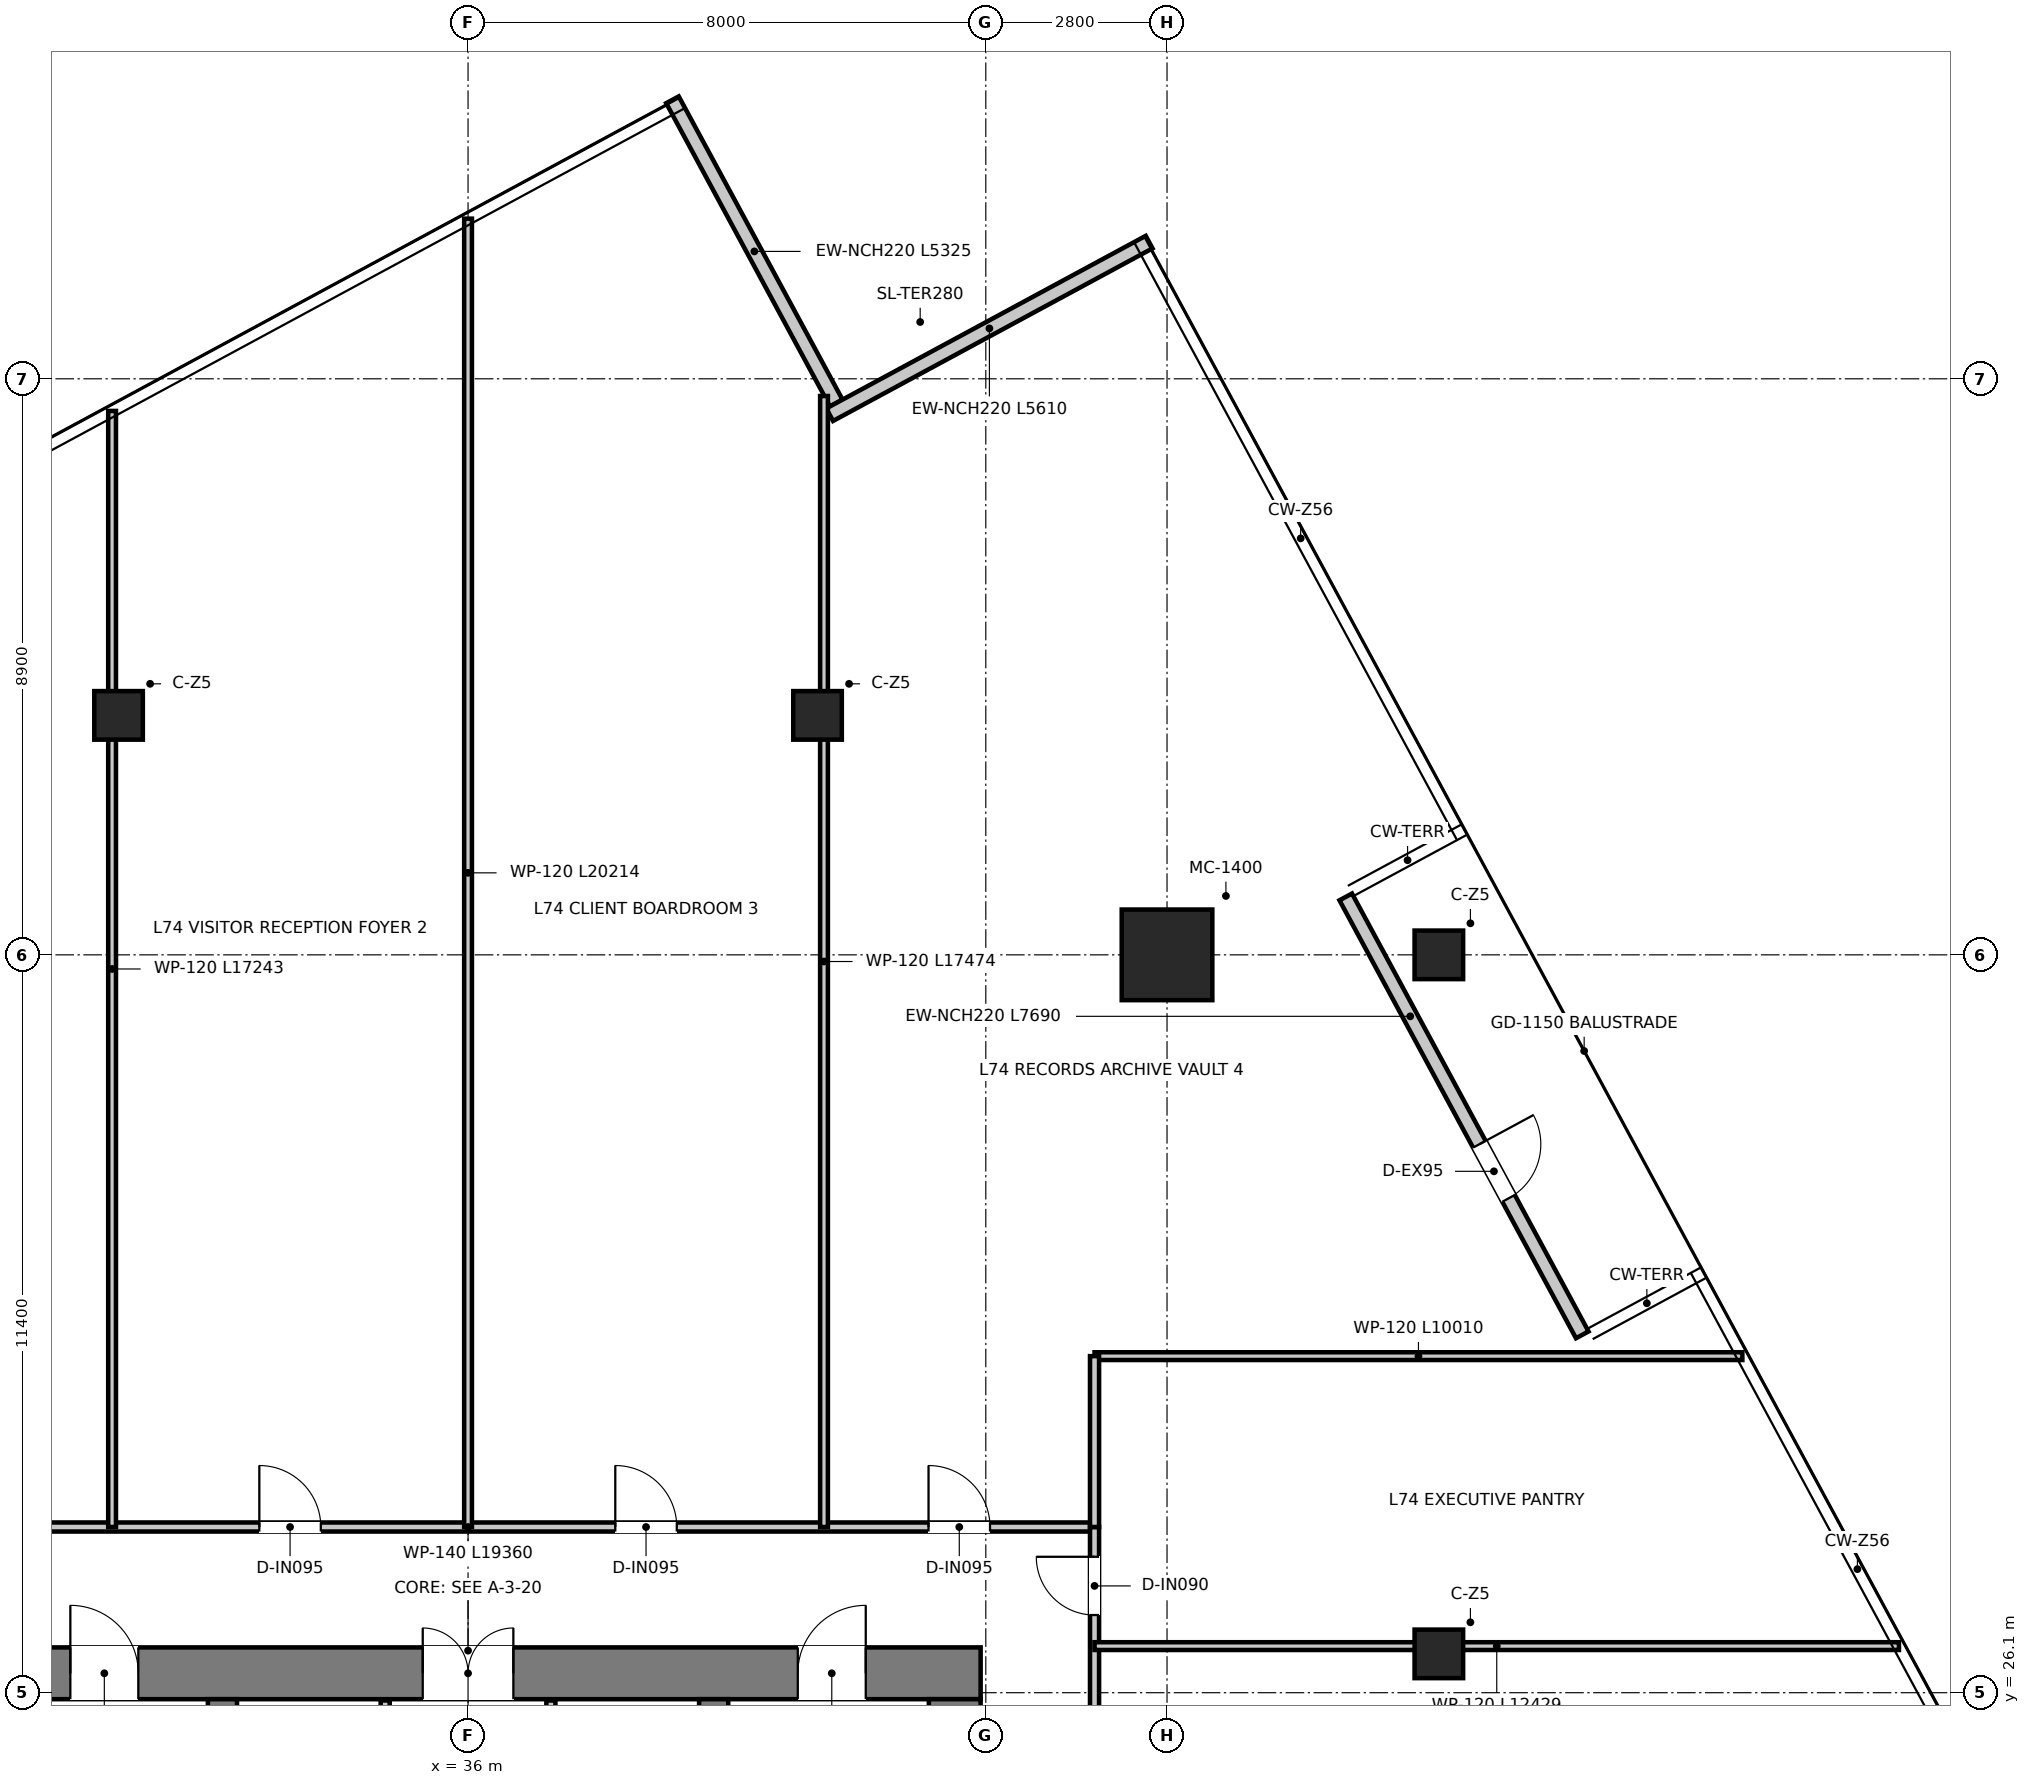
"""IFC4 building model, lengths in metres.
Left out: names, types, materials, properties, quantities, classifications, styles, units other than length and angle.
Written with IfcOpenShell. Run it as: python <this file> out.ifc"""

import sys

from ifc_helpers import new_model, si_unit, direction, frame, frame_2d, origin, origin_2d, place, context, subcontext, project, spatial, rectangle, extrude, source, transform, mapped, element, fill, save


model = new_model("IFC4")
c1 = context("Model", 3, precision=1e-05, world=origin(), true_north=direction((0.0, 1.0)))
c2 = subcontext(c1, "Body", "Model", "MODEL_VIEW")
j1 = project(units=[si_unit("LENGTHUNIT", "METRE"), si_unit("PLANEANGLEUNIT", "RADIAN")], contexts=[c1])
p1 = place(None, origin())
s1 = spatial("IfcSite", under=j1, at=p1, CompositionType="ELEMENT")
p2 = place(p1, origin())
s2 = spatial("IfcBuilding", under=s1, at=p2, CompositionType="ELEMENT")
p3 = place(p2, frame((0.0, 0.0, 302.95)))
s3 = spatial("IfcBuildingStorey", under=s2, at=p3, CompositionType="ELEMENT", Elevation=302.95)
p4 = place(p3, frame((28.08, 26.4, 0.0), z_axis=(0.0, 0.0, 1.0), x_axis=(1.0, 0.0, 0.0)))
e1 = element("IfcWall", 1, at=p4, inside=s3, PredefinedType="SHEAR", context=c2, shape_type="SweptSolid", body=[
    extrude(rectangle(XDim=15.84, YDim=0.8, at=frame_2d((7.92, 0.0))), origin(), (0.0, 0.0, 1.0), 3.95),
])
p5 = place(p4, frame((7.22, 0.0, 0.0)))
e2 = element("IfcOpeningElement", 2, at=p5, cuts=e1, PredefinedType="OPENING", context=c2, shape_type="SweptSolid", body=[
    extrude(rectangle(XDim=1.4, YDim=2.2, at=frame_2d((0.7, 1.1))), frame((0.0, 0.41, 0.0), z_axis=(0.0, -1.0, 0.0), x_axis=(1.0, 0.0, 0.0)), (0.0, 0.0, 1.0), 0.82),
])
p6 = place(p4, frame((1.775, 0.0, 0.0)))
e3 = element("IfcOpeningElement", 3, at=p6, cuts=e1, PredefinedType="OPENING", context=c2, shape_type="SweptSolid", body=[
    extrude(rectangle(XDim=1.05, YDim=2.1, at=frame_2d((0.525, 1.05))), frame((0.0, 0.41, 0.0), z_axis=(0.0, -1.0, 0.0), x_axis=(1.0, 0.0, 0.0)), (0.0, 0.0, 1.0), 0.82),
])
p7 = place(p4, frame((13.015, 0.0, 0.0)))
e4 = element("IfcOpeningElement", 4, at=p7, cuts=e1, PredefinedType="OPENING", context=c2, shape_type="SweptSolid", body=[
    extrude(rectangle(XDim=1.05, YDim=2.1, at=frame_2d((0.525, 1.05))), frame((0.0, 0.41, 0.0), z_axis=(0.0, -1.0, 0.0), x_axis=(1.0, 0.0, 0.0)), (0.0, 0.0, 1.0), 0.82),
])
p8 = place(p3, frame((43.52, 11.3, 0.0), z_axis=(0.0, 0.0, 1.0), x_axis=(0.0, 1.0, 0.0)))
e5 = element("IfcWall", 5, at=p8, inside=s3, PredefinedType="SHEAR", context=c2, shape_type="SweptSolid", body=[
    extrude(rectangle(XDim=14.7, YDim=0.8, at=frame_2d((7.35, 0.0))), origin(), (0.0, 0.0, 1.0), 3.95),
])
p9 = place(p3, frame((32.205, 13.22, 0.0), z_axis=(0.0, 0.0, 1.0), x_axis=(0.0, 1.0, 0.0)))
e6 = element("IfcWall", 6, at=p9, inside=s3, PredefinedType="SHEAR", context=c2, shape_type="SweptSolid", body=[
    extrude(rectangle(XDim=12.78, YDim=0.45, at=frame_2d((6.39, 0.0))), origin(), (0.0, 0.0, 1.0), 3.95),
])
p10 = place(p9, frame((10.58, 0.0, 0.0)))
e7 = element("IfcOpeningElement", 7, at=p10, cuts=e6, PredefinedType="OPENING", context=c2, shape_type="SweptSolid", body=[
    extrude(rectangle(XDim=1.1, YDim=2.15, at=frame_2d((0.55, 1.075))), frame((0.0, 0.235, 0.0), z_axis=(0.0, -1.0, 0.0), x_axis=(1.0, 0.0, 0.0)), (0.0, 0.0, 1.0), 0.47),
])
p11 = place(p3, frame((39.795, 13.22, 0.0), z_axis=(0.0, 0.0, 1.0), x_axis=(0.0, 1.0, 0.0)))
e8 = element("IfcWall", 8, at=p11, inside=s3, PredefinedType="SHEAR", context=c2, shape_type="SweptSolid", body=[
    extrude(rectangle(XDim=12.78, YDim=0.45, at=frame_2d((6.39, 0.0))), origin(), (0.0, 0.0, 1.0), 3.95),
])
p12 = place(p11, frame((10.58, 0.0, 0.0)))
e9 = element("IfcOpeningElement", 9, at=p12, cuts=e8, PredefinedType="OPENING", context=c2, shape_type="SweptSolid", body=[
    extrude(rectangle(XDim=1.1, YDim=2.15, at=frame_2d((0.55, 1.075))), frame((0.0, 0.235, 0.0), z_axis=(0.0, -1.0, 0.0), x_axis=(1.0, 0.0, 0.0)), (0.0, 0.0, 1.0), 0.47),
])
m1 = source(origin(), c2, "Body", "SweptSolid", [
    extrude(rectangle(XDim=1.4, YDim=1.4, at=origin_2d()), origin(), (0.0, 0.0, 1.0), 3.95),
])
p13 = place(p3, frame((46.8, 37.5, 0.0), z_axis=(0.0, 0.0, 1.0), x_axis=(1.0, 0.0, 0.0)))
e10 = element("IfcColumn", 10, at=p13, inside=s3, PredefinedType="USERDEFINED", context=c2, shape_type="MappedRepresentation", body=[
    mapped(m1, transform((0.0, 0.0, 0.0), x_axis=(1.0, 0.0, 0.0), y_axis=(0.0, 1.0, 0.0), z_axis=(0.0, 0.0, 1.0), scale=1.0)),
])
m2 = source(origin(), c2, "Body", "SweptSolid", [
    extrude(rectangle(XDim=0.75, YDim=0.75, at=origin_2d()), origin(), (0.0, 0.0, 1.0), 3.95),
])
for number, where, z_axis, x_axis in (
    (11, (30.6, 41.2, 0.0), (0.0, 0.0, 1.0), (1.0, 0.0, 0.0)),
    (12, (41.4, 41.2, 0.0), (0.0, 0.0, 1.0), (1.0, 0.0, 0.0)),
    (13, (51.0, 37.5, 0.0), (0.0, 0.0, 1.0), (1.0, 0.0, 0.0)),
    (14, (51.0, 26.7, 0.0), (0.0, 0.0, 1.0), (1.0, 0.0, 0.0)),
):
    element("IfcColumn", number, at=place(p3, frame(where, z_axis=z_axis, x_axis=x_axis)), inside=s3, PredefinedType="COLUMN", context=c2, shape_type="MappedRepresentation", body=[
        mapped(m2, transform((0.0, 0.0, 0.0), x_axis=(1.0, 0.0, 0.0), y_axis=(0.0, 1.0, 0.0), z_axis=(0.0, 0.0, 1.0), scale=1.0)),
    ])
p14 = place(p3, frame((41.689, 46.026, 0.0), z_axis=(0.0, 0.0, 1.0), x_axis=(-0.475250431035, 0.879850571291, 0.0)))
e15 = element("IfcWall", 15, at=p14, inside=s3, PredefinedType="ELEMENTEDWALL", context=c2, shape_type="SweptSolid", body=[
    extrude(rectangle(XDim=5.325, YDim=0.22, at=frame_2d((2.663, 0.0))), origin(), (0.0, 0.0, 1.0), 3.67),
])
p15 = place(p3, frame((49.561, 38.395, 0.0), z_axis=(0.0, 0.0, 1.0), x_axis=(0.475258045718, -0.879846458185, 0.0)))
e16 = element("IfcWall", 16, at=p15, inside=s3, PredefinedType="ELEMENTEDWALL", context=c2, shape_type="SweptSolid", body=[
    extrude(rectangle(XDim=7.69, YDim=0.22, at=frame_2d((3.845, 0.0))), origin(), (0.0, 0.0, 1.0), 3.18),
])
p16 = place(p15, frame((4.343, 0.0, 0.0)))
e17 = element("IfcOpeningElement", 17, at=p16, cuts=e16, PredefinedType="OPENING", context=c2, shape_type="SweptSolid", body=[
    extrude(rectangle(XDim=0.95, YDim=2.1, at=frame_2d((0.475, 1.05))), frame((0.0, 0.12, 0.0), z_axis=(0.0, -1.0, 0.0), x_axis=(1.0, 0.0, 0.0)), (0.0, 0.0, 1.0), 0.24),
])
p17 = place(p3, frame((46.523, 48.512, 0.0), z_axis=(0.0, 0.0, 1.0), x_axis=(-0.879863910566, -0.475225734661, 0.0)))
e18 = element("IfcWall", 18, at=p17, inside=s3, PredefinedType="ELEMENTEDWALL", context=c2, shape_type="SweptSolid", body=[
    extrude(rectangle(XDim=5.61, YDim=0.22, at=frame_2d((2.805, 0.0))), origin(), (0.0, 0.0, 1.0), 3.67),
])
p18 = place(p3, frame((34.72, 20.2, 0.0), z_axis=(0.0, 0.0, 1.0), x_axis=(0.0, 1.0, 0.0)))
e19 = element("IfcWall", 19, at=p18, inside=s3, PredefinedType="PARTITIONING", context=c2, shape_type="SweptSolid", body=[
    extrude(rectangle(XDim=5.78, YDim=0.14, at=frame_2d((2.89, 0.0))), origin(), (0.0, 0.0, 1.0), 2.82),
])
p19 = place(p18, frame((1.05, 0.0, 0.0)))
e20 = element("IfcOpeningElement", 20, at=p19, cuts=e19, PredefinedType="OPENING", context=c2, shape_type="SweptSolid", body=[
    extrude(rectangle(XDim=0.9, YDim=2.1, at=frame_2d((0.45, 1.05))), frame((0.0, 0.08, 0.0), z_axis=(0.0, -1.0, 0.0), x_axis=(1.0, 0.0, 0.0)), (0.0, 0.0, 1.0), 0.16),
])
p20 = place(p3, frame((37.28, 20.2, 0.0), z_axis=(0.0, 0.0, 1.0), x_axis=(0.0, 1.0, 0.0)))
e21 = element("IfcWall", 21, at=p20, inside=s3, PredefinedType="PARTITIONING", context=c2, shape_type="SweptSolid", body=[
    extrude(rectangle(XDim=5.78, YDim=0.14, at=frame_2d((2.89, 0.0))), origin(), (0.0, 0.0, 1.0), 2.82),
])
p21 = place(p20, frame((0.95, 0.0, 0.0)))
e22 = element("IfcOpeningElement", 22, at=p21, cuts=e21, PredefinedType="OPENING", context=c2, shape_type="SweptSolid", body=[
    extrude(rectangle(XDim=1.1, YDim=2.15, at=frame_2d((0.55, 1.075))), frame((0.0, 0.08, 0.0), z_axis=(0.0, -1.0, 0.0), x_axis=(1.0, 0.0, 0.0)), (0.0, 0.0, 1.0), 0.16),
])
p22 = place(p3, frame((26.32, 28.66, 0.0), z_axis=(0.0, 0.0, 1.0), x_axis=(1.0, 0.0, 0.0)))
e23 = element("IfcWall", 23, at=p22, inside=s3, PredefinedType="PARTITIONING", context=c2, shape_type="SweptSolid", body=[
    extrude(rectangle(XDim=19.36, YDim=0.14, at=frame_2d((9.68, 0.0))), origin(), (0.0, 0.0, 1.0), 3.18),
])
p23 = place(p22, frame((1.615, 0.0, 0.0)))
e24 = element("IfcOpeningElement", 24, at=p23, cuts=e23, PredefinedType="OPENING", context=c2, shape_type="SweptSolid", body=[
    extrude(rectangle(XDim=0.95, YDim=2.1, at=frame_2d((0.475, 1.05))), frame((0.0, 0.08, 0.0), z_axis=(0.0, -1.0, 0.0), x_axis=(1.0, 0.0, 0.0)), (0.0, 0.0, 1.0), 0.16),
])
p24 = place(p22, frame((6.455, 0.0, 0.0)))
e25 = element("IfcOpeningElement", 25, at=p24, cuts=e23, PredefinedType="OPENING", context=c2, shape_type="SweptSolid", body=[
    extrude(rectangle(XDim=0.95, YDim=2.1, at=frame_2d((0.475, 1.05))), frame((0.0, 0.08, 0.0), z_axis=(0.0, -1.0, 0.0), x_axis=(1.0, 0.0, 0.0)), (0.0, 0.0, 1.0), 0.16),
])
p25 = place(p22, frame((11.955, 0.0, 0.0)))
e26 = element("IfcOpeningElement", 26, at=p25, cuts=e23, PredefinedType="OPENING", context=c2, shape_type="SweptSolid", body=[
    extrude(rectangle(XDim=0.95, YDim=2.1, at=frame_2d((0.475, 1.05))), frame((0.0, 0.08, 0.0), z_axis=(0.0, -1.0, 0.0), x_axis=(1.0, 0.0, 0.0)), (0.0, 0.0, 1.0), 0.16),
])
p26 = place(p22, frame((16.795, 0.0, 0.0)))
e27 = element("IfcOpeningElement", 27, at=p26, cuts=e23, PredefinedType="OPENING", context=c2, shape_type="SweptSolid", body=[
    extrude(rectangle(XDim=0.95, YDim=2.1, at=frame_2d((0.475, 1.05))), frame((0.0, 0.08, 0.0), z_axis=(0.0, -1.0, 0.0), x_axis=(1.0, 0.0, 0.0)), (0.0, 0.0, 1.0), 0.16),
])
p27 = place(p3, frame((45.68, 9.754, 0.0), z_axis=(0.0, 0.0, 1.0), x_axis=(0.0, 1.0, 0.0)))
e28 = element("IfcWall", 28, at=p27, inside=s3, PredefinedType="PARTITIONING", context=c2, shape_type="SweptSolid", body=[
    extrude(rectangle(XDim=18.906, YDim=0.14, at=frame_2d((9.453, 0.0))), origin(), (0.0, 0.0, 1.0), 3.13),
])
p28 = place(p27, frame((17.546, 0.0, 0.0)))
e29 = element("IfcOpeningElement", 29, at=p28, cuts=e28, PredefinedType="OPENING", context=c2, shape_type="SweptSolid", body=[
    extrude(rectangle(XDim=0.9, YDim=2.1, at=frame_2d((0.45, 1.05))), frame((0.0, 0.08, 0.0), z_axis=(0.0, -1.0, 0.0), x_axis=(1.0, 0.0, 0.0)), (0.0, 0.0, 1.0), 0.16),
])
p29 = place(p27, frame((11.956, 0.0, 0.0)))
e30 = element("IfcOpeningElement", 30, at=p29, cuts=e28, PredefinedType="OPENING", context=c2, shape_type="SweptSolid", body=[
    extrude(rectangle(XDim=0.9, YDim=2.1, at=frame_2d((0.45, 1.05))), frame((0.0, 0.08, 0.0), z_axis=(0.0, -1.0, 0.0), x_axis=(1.0, 0.0, 0.0)), (0.0, 0.0, 1.0), 0.16),
])
p30 = place(p3, frame((45.68, 26.82, 0.0), z_axis=(0.0, 0.0, 1.0), x_axis=(1.0, 0.0, 0.0)))
e31 = element("IfcWall", 31, at=p30, inside=s3, PredefinedType="PARTITIONING", context=c2, shape_type="SweptSolid", body=[
    extrude(rectangle(XDim=12.429, YDim=0.12, at=frame_2d((6.215, 0.0))), origin(), (0.0, 0.0, 1.0), 3.13),
])
p31 = place(p3, frame((45.68, 31.3, 0.0), z_axis=(0.0, 0.0, 1.0), x_axis=(1.0, 0.0, 0.0)))
e32 = element("IfcWall", 32, at=p31, inside=s3, PredefinedType="PARTITIONING", context=c2, shape_type="SweptSolid", body=[
    extrude(rectangle(XDim=10.01, YDim=0.12, at=frame_2d((5.005, 0.0))), origin(), (0.0, 0.0, 1.0), 3.13),
])
p32 = place(p3, frame((45.68, 28.66, 0.0), z_axis=(0.0, 0.0, 1.0), x_axis=(0.0, 1.0, 0.0)))
e33 = element("IfcWall", 33, at=p32, inside=s3, PredefinedType="PARTITIONING", context=c2, shape_type="SweptSolid", body=[
    extrude(rectangle(XDim=2.64, YDim=0.14, at=frame_2d((1.32, 0.0))), origin(), (0.0, 0.0, 1.0), 3.43),
])
p33 = place(p3, frame((30.5, 28.66, 0.0), z_axis=(0.0, 0.0, 1.0), x_axis=(0.0, 1.0, 0.0)))
e34 = element("IfcWall", 34, at=p33, inside=s3, PredefinedType="PARTITIONING", context=c2, shape_type="SweptSolid", body=[
    extrude(rectangle(XDim=17.243, YDim=0.12, at=frame_2d((8.622, 0.0))), origin(), (0.0, 0.0, 1.0), 3.13),
])
p34 = place(p3, frame((36.0, 28.66, 0.0), z_axis=(0.0, 0.0, 1.0), x_axis=(0.0, 1.0, 0.0)))
e35 = element("IfcWall", 35, at=p34, inside=s3, PredefinedType="PARTITIONING", context=c2, shape_type="SweptSolid", body=[
    extrude(rectangle(XDim=20.214, YDim=0.12, at=frame_2d((10.107, 0.0))), origin(), (0.0, 0.0, 1.0), 3.13),
])
p35 = place(p3, frame((41.5, 28.66, 0.0), z_axis=(0.0, 0.0, 1.0), x_axis=(0.0, 1.0, 0.0)))
e36 = element("IfcWall", 36, at=p35, inside=s3, PredefinedType="PARTITIONING", context=c2, shape_type="SweptSolid", body=[
    extrude(rectangle(XDim=17.474, YDim=0.12, at=frame_2d((8.737, 0.0))), origin(), (0.0, 0.0, 1.0), 3.13),
])
p36 = place(p5, origin())
e37 = element("IfcDoor", 37, at=p36, inside=s3, OperationType="DOUBLE_DOOR_SINGLE_SWING", PredefinedType="DOOR", context=c2, shape_type="SweptSolid", body=[
    extrude(rectangle(XDim=1.4, YDim=2.2, at=frame_2d((0.7, 1.1))), frame((0.0, 0.025, 0.0), z_axis=(0.0, -1.0, 0.0), x_axis=(1.0, 0.0, 0.0)), (0.0, 0.0, 1.0), 0.05),
])
fill(e2, e37)
p37 = place(p6, origin())
e38 = element("IfcDoor", 38, at=p37, inside=s3, OperationType="SINGLE_SWING_LEFT", PredefinedType="DOOR", context=c2, shape_type="SweptSolid", body=[
    extrude(rectangle(XDim=1.05, YDim=2.1, at=frame_2d((0.525, 1.05))), frame((0.0, 0.025, 0.0), z_axis=(0.0, -1.0, 0.0), x_axis=(1.0, 0.0, 0.0)), (0.0, 0.0, 1.0), 0.05),
])
fill(e3, e38)
p38 = place(p7, origin())
e39 = element("IfcDoor", 39, at=p38, inside=s3, OperationType="SINGLE_SWING_RIGHT", PredefinedType="DOOR", context=c2, shape_type="SweptSolid", body=[
    extrude(rectangle(XDim=1.05, YDim=2.1, at=frame_2d((0.525, 1.05))), frame((0.0, 0.025, 0.0), z_axis=(0.0, -1.0, 0.0), x_axis=(1.0, 0.0, 0.0)), (0.0, 0.0, 1.0), 0.05),
])
fill(e4, e39)
p39 = place(p28, origin())
e40 = element("IfcDoor", 40, at=p39, inside=s3, OperationType="SINGLE_SWING_RIGHT", PredefinedType="DOOR", context=c2, shape_type="SweptSolid", body=[
    extrude(rectangle(XDim=0.9, YDim=2.1, at=frame_2d((0.45, 1.05))), frame((0.0, 0.025, 0.0), z_axis=(0.0, -1.0, 0.0), x_axis=(1.0, 0.0, 0.0)), (0.0, 0.0, 1.0), 0.05),
])
fill(e29, e40)
p40 = place(p24, origin())
e41 = element("IfcDoor", 41, at=p40, inside=s3, OperationType="SINGLE_SWING_LEFT", PredefinedType="DOOR", context=c2, shape_type="SweptSolid", body=[
    extrude(rectangle(XDim=0.95, YDim=2.1, at=frame_2d((0.475, 1.05))), frame((0.0, 0.025, 0.0), z_axis=(0.0, -1.0, 0.0), x_axis=(1.0, 0.0, 0.0)), (0.0, 0.0, 1.0), 0.05),
])
fill(e25, e41)
p41 = place(p25, origin())
e42 = element("IfcDoor", 42, at=p41, inside=s3, OperationType="SINGLE_SWING_LEFT", PredefinedType="DOOR", context=c2, shape_type="SweptSolid", body=[
    extrude(rectangle(XDim=0.95, YDim=2.1, at=frame_2d((0.475, 1.05))), frame((0.0, 0.025, 0.0), z_axis=(0.0, -1.0, 0.0), x_axis=(1.0, 0.0, 0.0)), (0.0, 0.0, 1.0), 0.05),
])
fill(e26, e42)
p42 = place(p26, origin())
e43 = element("IfcDoor", 43, at=p42, inside=s3, OperationType="SINGLE_SWING_LEFT", PredefinedType="DOOR", context=c2, shape_type="SweptSolid", body=[
    extrude(rectangle(XDim=0.95, YDim=2.1, at=frame_2d((0.475, 1.05))), frame((0.0, 0.025, 0.0), z_axis=(0.0, -1.0, 0.0), x_axis=(1.0, 0.0, 0.0)), (0.0, 0.0, 1.0), 0.05),
])
fill(e27, e43)
p43 = place(p16, origin())
e44 = element("IfcDoor", 44, at=p43, inside=s3, OperationType="SINGLE_SWING_LEFT", PredefinedType="DOOR", context=c2, shape_type="SweptSolid", body=[
    extrude(rectangle(XDim=0.95, YDim=2.1, at=frame_2d((0.475, 1.05))), frame((0.0, 0.025, 0.0), z_axis=(0.0, -1.0, 0.0), x_axis=(1.0, 0.0, 0.0)), (0.0, 0.0, 1.0), 0.05),
])
fill(e17, e44)
save(model, sys.argv[1])
